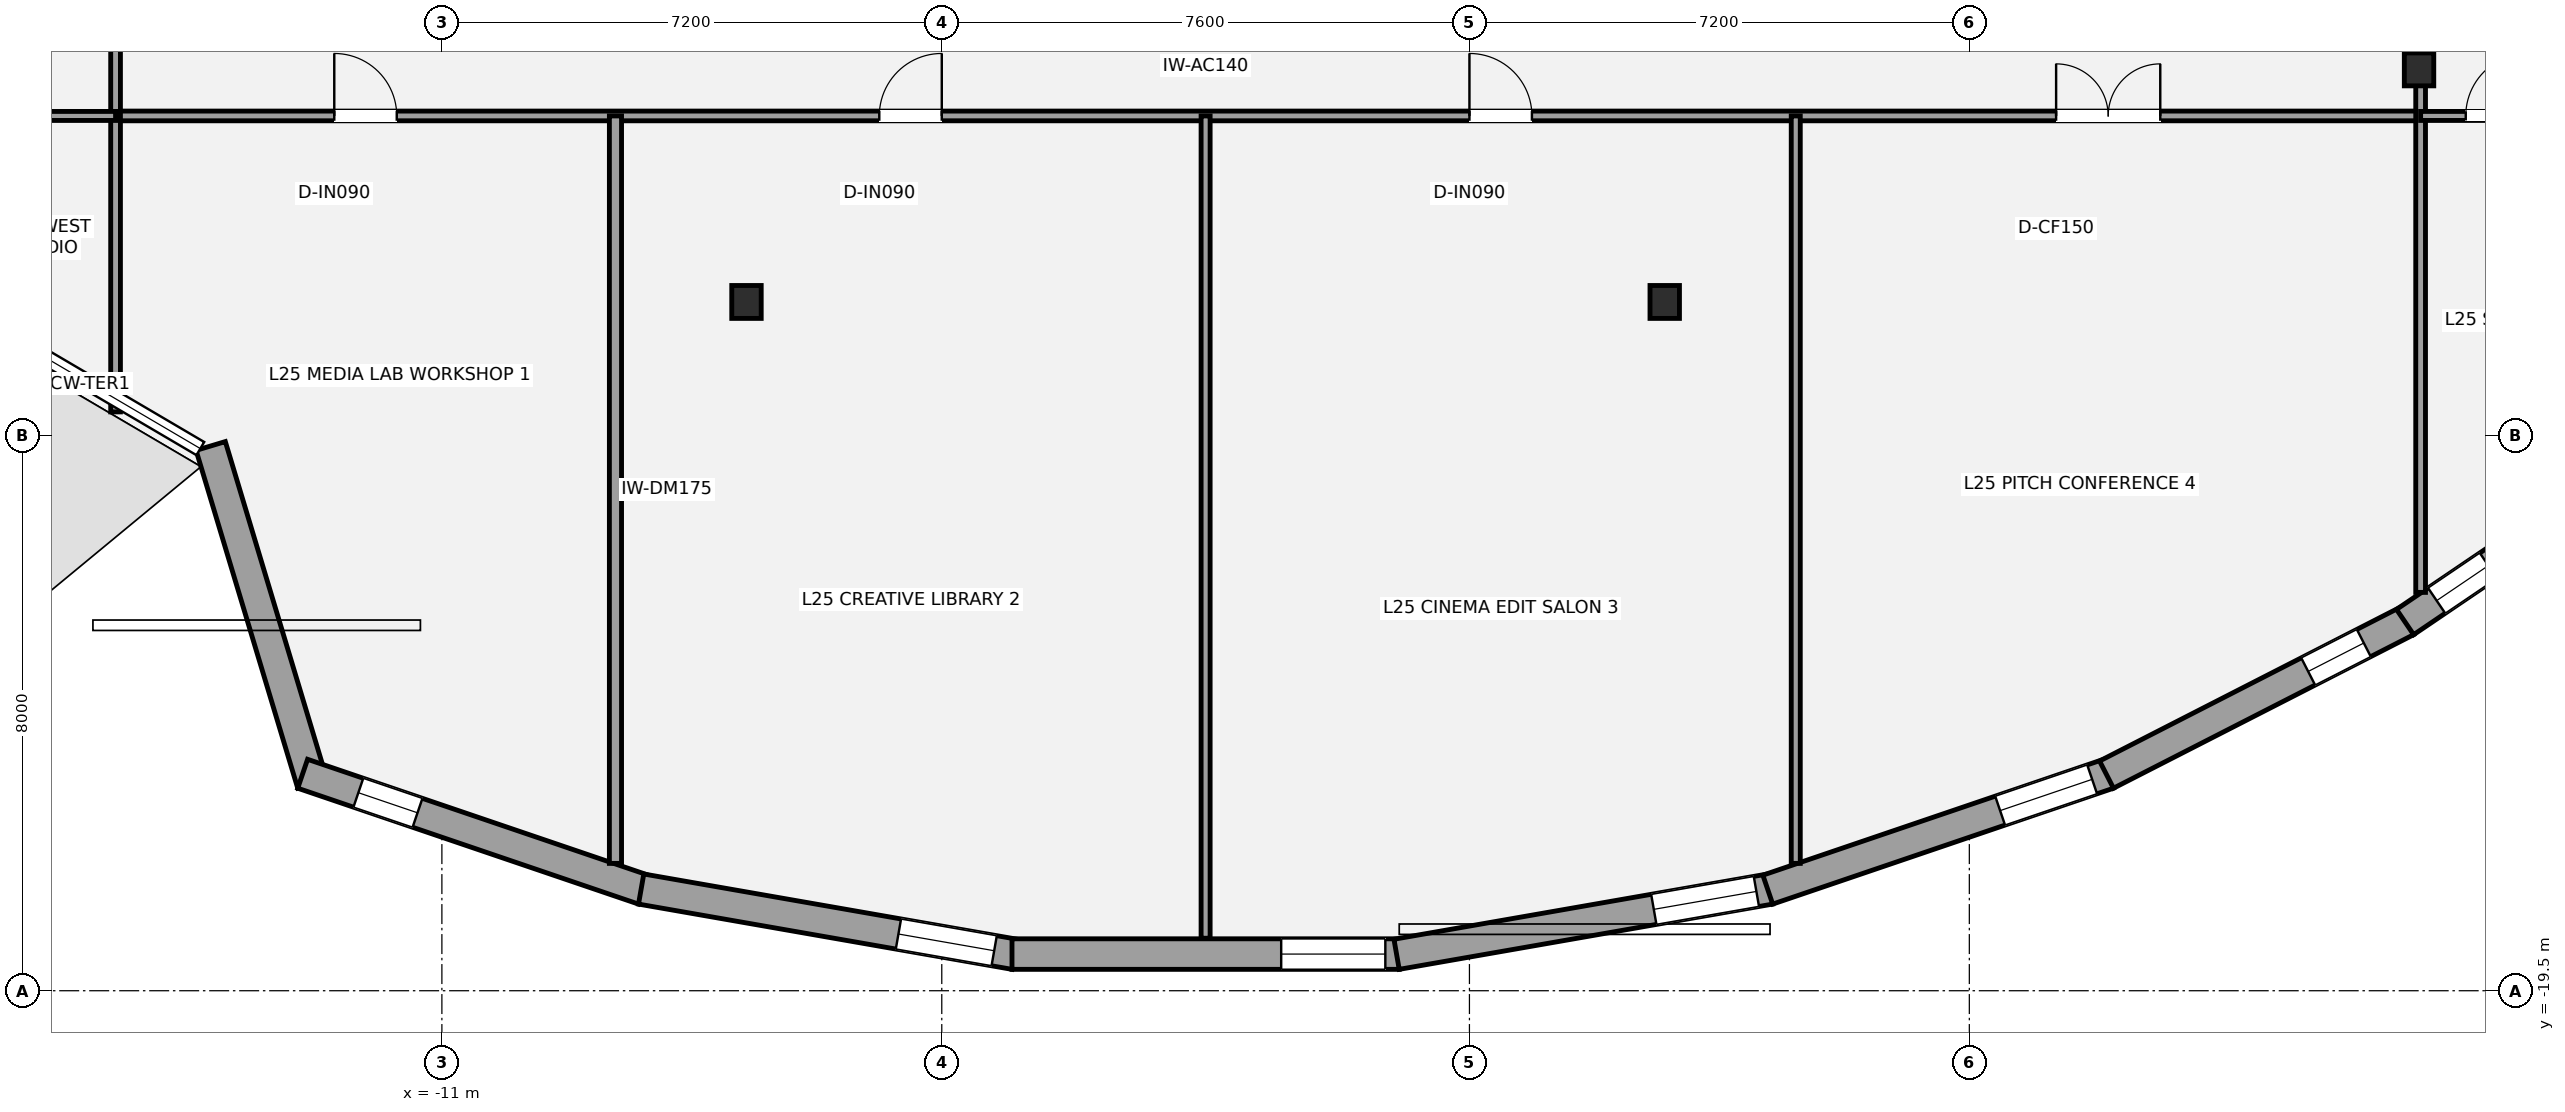
"""IFC4 building model, lengths in metres.
Left out: names, types, materials, properties, quantities, classifications, styles, units other than length and angle.
Written with IfcOpenShell. Run it as: python <this file> out.ifc"""

import sys

from ifc_helpers import new_model, si_unit, direction, frame, frame_2d, origin, origin_2d, place, context, subcontext, project, spatial, rectangle, i_section, extrude, element, fill, save


model = new_model("IFC4")
c1 = context("Model", 3, precision=1e-05, world=origin(), true_north=direction((0.0, 1.0)))
c2 = subcontext(c1, "Body", "Model", "MODEL_VIEW")
j1 = project(units=[si_unit("LENGTHUNIT", "METRE"), si_unit("PLANEANGLEUNIT", "RADIAN")], contexts=[c1])
p1 = place(None, origin())
s1 = spatial("IfcSite", under=j1, at=p1, CompositionType="ELEMENT")
p2 = place(p1, origin())
s2 = spatial("IfcBuilding", under=s1, at=p2, CompositionType="ELEMENT")
p3 = place(p2, frame((0.0, 0.0, 96.6)))
s3 = spatial("IfcBuildingStorey", under=s2, at=p3, CompositionType="ELEMENT", Elevation=96.6)
for number, where, z_axis, x_axis in (
    (1, (-6.613, -9.579, 0.0), (0.0, 0.0, 1.0), (1.0, 0.0, 0.0)),
    (2, (6.613, -9.579, 0.0), (0.0, 0.0, 1.0), (1.0, 0.0, 0.0)),
    (3, (17.477, -6.229, 0.0), (0.0, 0.0, 1.0), (1.0, 0.0, 0.0)),
):
    element("IfcColumn", number, at=place(p3, frame(where, z_axis=z_axis, x_axis=x_axis)), inside=s3, PredefinedType="COLUMN", context=c2, shape_type="SweptSolid", body=[
        extrude(i_section(OverallWidth=0.424, OverallDepth=0.474, WebThickness=0.048, FlangeThickness=0.077, at=origin_2d()), origin(), (0.0, 0.0, 1.0), 3.5),
    ])
p4 = place(p3, frame((-12.865, -16.52, 0.0), z_axis=(0.0, 0.0, 1.0), x_axis=(-0.288172032056, 0.957578654702, 0.0)))
e4 = element("IfcWall", 4, at=p4, inside=s3, PredefinedType="STANDARD", context=c2, shape_type="SweptSolid", body=[
    extrude(rectangle(XDim=5.082, YDim=0.44, at=frame_2d((2.541, 0.0))), origin(), (0.0, 0.0, 1.0), 2.532),
])
p5 = place(p3, frame((-8.097, -18.044, 0.0), z_axis=(0.0, 0.0, 1.0), x_axis=(-0.946763558794, 0.321929749697, 0.0)))
e5 = element("IfcWall", 5, at=p5, inside=s3, PredefinedType="STANDARD", context=c2, shape_type="SweptSolid", body=[
    extrude(rectangle(XDim=5.184, YDim=0.44, at=frame_2d((2.592, 0.0))), origin(), (0.0, 0.0, 1.0), 2.528),
])
p6 = place(p5, frame((3.437, 0.0, 0.58)))
e6 = element("IfcOpeningElement", 6, at=p6, cuts=e5, PredefinedType="OPENING", context=c2, shape_type="SweptSolid", body=[
    extrude(rectangle(XDim=0.9, YDim=1.35, at=frame_2d((0.45, 0.675))), frame((0.0, 0.23, 0.0), z_axis=(0.0, -1.0, 0.0), x_axis=(1.0, 0.0, 0.0)), (0.0, 0.0, 1.0), 0.46),
])
p7 = place(p3, frame((-2.751, -18.975, 0.0), z_axis=(0.0, 0.0, 1.0), x_axis=(-0.985074276728, 0.172129803722, 0.0)))
e7 = element("IfcWall", 7, at=p7, inside=s3, PredefinedType="STANDARD", context=c2, shape_type="SweptSolid", body=[
    extrude(rectangle(XDim=5.461, YDim=0.44, at=frame_2d((2.73, 0.0))), origin(), (0.0, 0.0, 1.0), 2.528),
])
p8 = place(p7, frame((0.299, 0.0, 0.58)))
e8 = element("IfcOpeningElement", 8, at=p8, cuts=e7, PredefinedType="OPENING", context=c2, shape_type="SweptSolid", body=[
    extrude(rectangle(XDim=1.4, YDim=1.55, at=frame_2d((0.7, 0.775))), frame((0.0, 0.23, 0.0), z_axis=(0.0, -1.0, 0.0), x_axis=(1.0, 0.0, 0.0)), (0.0, 0.0, 1.0), 0.46),
])
p9 = place(p3, frame((2.789, -18.972, 0.0), z_axis=(0.0, 0.0, 1.0), x_axis=(-1.0, 0.0, 0.0)))
e9 = element("IfcWall", 9, at=p9, inside=s3, PredefinedType="STANDARD", context=c2, shape_type="SweptSolid", body=[
    extrude(rectangle(XDim=5.577, YDim=0.44, at=frame_2d((2.789, 0.0))), origin(), (0.0, 0.0, 1.0), 2.528),
])
p10 = place(p9, frame((0.2, 0.0, 0.65)))
e10 = element("IfcOpeningElement", 10, at=p10, cuts=e9, PredefinedType="OPENING", context=c2, shape_type="SweptSolid", body=[
    extrude(rectangle(XDim=1.5, YDim=1.7, at=frame_2d((0.75, 0.85))), frame((0.0, 0.23, 0.0), z_axis=(0.0, -1.0, 0.0), x_axis=(1.0, 0.0, 0.0)), (0.0, 0.0, 1.0), 0.46),
])
p11 = place(p3, frame((8.13, -18.035, 0.0), z_axis=(0.0, 0.0, 1.0), x_axis=(-0.985074276728, -0.172129803722, 0.0)))
e11 = element("IfcWall", 11, at=p11, inside=s3, PredefinedType="STANDARD", context=c2, shape_type="SweptSolid", body=[
    extrude(rectangle(XDim=5.461, YDim=0.44, at=frame_2d((2.73, 0.0))), origin(), (0.0, 0.0, 1.0), 2.528),
])
p12 = place(p11, frame((0.2, 0.0, 0.48)))
e12 = element("IfcOpeningElement", 12, at=p12, cuts=e11, PredefinedType="OPENING", context=c2, shape_type="SweptSolid", body=[
    extrude(rectangle(XDim=1.5, YDim=1.7, at=frame_2d((0.75, 0.85))), frame((0.0, 0.23, 0.0), z_axis=(0.0, -1.0, 0.0), x_axis=(1.0, 0.0, 0.0)), (0.0, 0.0, 1.0), 0.46),
])
p13 = place(p3, frame((13.005, -16.375, 0.0), z_axis=(0.0, 0.0, 1.0), x_axis=(-0.946763558794, -0.321929749697, 0.0)))
e13 = element("IfcWall", 13, at=p13, inside=s3, PredefinedType="STANDARD", context=c2, shape_type="SweptSolid", body=[
    extrude(rectangle(XDim=5.184, YDim=0.44, at=frame_2d((2.592, 0.0))), origin(), (0.0, 0.0, 1.0), 2.528),
])
p14 = place(p13, frame((0.25, 0.0, 0.85)))
e14 = element("IfcOpeningElement", 14, at=p14, cuts=e13, PredefinedType="OPENING", context=c2, shape_type="SweptSolid", body=[
    extrude(rectangle(XDim=1.4, YDim=1.55, at=frame_2d((0.7, 0.775))), frame((0.0, 0.23, 0.0), z_axis=(0.0, -1.0, 0.0), x_axis=(1.0, 0.0, 0.0)), (0.0, 0.0, 1.0), 0.46),
])
p15 = place(p3, frame((17.3, -14.176, 0.0), z_axis=(0.0, 0.0, 1.0), x_axis=(-0.890297461787, -0.455379434687, 0.0)))
e15 = element("IfcWall", 15, at=p15, inside=s3, PredefinedType="STANDARD", context=c2, shape_type="SweptSolid", body=[
    extrude(rectangle(XDim=4.856, YDim=0.44, at=frame_2d((2.428, 0.0))), origin(), (0.0, 0.0, 1.0), 2.528),
])
p16 = place(p15, frame((0.694, 0.0, 0.58)))
e16 = element("IfcOpeningElement", 16, at=p16, cuts=e15, PredefinedType="OPENING", context=c2, shape_type="SweptSolid", body=[
    extrude(rectangle(XDim=0.9, YDim=1.35, at=frame_2d((0.45, 0.675))), frame((0.0, 0.23, 0.0), z_axis=(0.0, -1.0, 0.0), x_axis=(1.0, 0.0, 0.0)), (0.0, 0.0, 1.0), 0.46),
])
p17 = place(p3, frame((21.078, -11.613, 0.0), z_axis=(0.0, 0.0, 1.0), x_axis=(-0.827740300315, -0.561111392893, 0.0)))
e17 = element("IfcWall", 17, at=p17, inside=s3, PredefinedType="STANDARD", context=c2, shape_type="SweptSolid", body=[
    extrude(rectangle(XDim=4.593, YDim=0.44, at=frame_2d((2.296, 0.0))), origin(), (0.0, 0.0, 1.0), 2.528),
])
p18 = place(p17, frame((3.144, 0.0, 0.58)))
e18 = element("IfcOpeningElement", 18, at=p18, cuts=e17, PredefinedType="OPENING", context=c2, shape_type="SweptSolid", body=[
    extrude(rectangle(XDim=0.9, YDim=1.35, at=frame_2d((0.45, 0.675))), frame((0.0, 0.23, 0.0), z_axis=(0.0, -1.0, 0.0), x_axis=(1.0, 0.0, 0.0)), (0.0, 0.0, 1.0), 0.46),
])
p19 = place(p3, frame((-15.7, -6.9, 0.0), z_axis=(0.0, 0.0, 1.0), x_axis=(1.0, 0.0, 0.0)))
e19 = element("IfcWall", 19, at=p19, inside=s3, PredefinedType="PARTITIONING", context=c2, shape_type="SweptSolid", body=[
    extrude(rectangle(XDim=33.2, YDim=0.14, at=frame_2d((16.6, 0.0))), origin(), (0.0, 0.0, 1.0), 2.688),
])
p20 = place(p19, frame((3.15, 0.0, 0.0)))
e20 = element("IfcOpeningElement", 20, at=p20, cuts=e19, PredefinedType="OPENING", context=c2, shape_type="SweptSolid", body=[
    extrude(rectangle(XDim=0.9, YDim=2.1, at=frame_2d((0.45, 1.05))), frame((0.0, 0.08, 0.0), z_axis=(0.0, -1.0, 0.0), x_axis=(1.0, 0.0, 0.0)), (0.0, 0.0, 1.0), 0.16),
])
p21 = place(p19, frame((11.0, 0.0, 0.0)))
e21 = element("IfcOpeningElement", 21, at=p21, cuts=e19, PredefinedType="OPENING", context=c2, shape_type="SweptSolid", body=[
    extrude(rectangle(XDim=0.9, YDim=2.1, at=frame_2d((0.45, 1.05))), frame((0.0, 0.08, 0.0), z_axis=(0.0, -1.0, 0.0), x_axis=(1.0, 0.0, 0.0)), (0.0, 0.0, 1.0), 0.16),
])
p22 = place(p19, frame((19.5, 0.0, 0.0)))
e22 = element("IfcOpeningElement", 22, at=p22, cuts=e19, PredefinedType="OPENING", context=c2, shape_type="SweptSolid", body=[
    extrude(rectangle(XDim=0.9, YDim=2.1, at=frame_2d((0.45, 1.05))), frame((0.0, 0.08, 0.0), z_axis=(0.0, -1.0, 0.0), x_axis=(1.0, 0.0, 0.0)), (0.0, 0.0, 1.0), 0.16),
])
p23 = place(p19, frame((27.95, 0.0, 0.0)))
e23 = element("IfcOpeningElement", 23, at=p23, cuts=e19, PredefinedType="OPENING", context=c2, shape_type="SweptSolid", body=[
    extrude(rectangle(XDim=1.5, YDim=2.15, at=frame_2d((0.75, 1.075))), frame((0.0, 0.08, 0.0), z_axis=(0.0, -1.0, 0.0), x_axis=(1.0, 0.0, 0.0)), (0.0, 0.0, 1.0), 0.16),
])
p24 = place(p3, frame((-15.7, -11.163, 0.0), z_axis=(0.0, 0.0, 1.0), x_axis=(0.0, 1.0, 0.0)))
e24 = element("IfcWall", 24, at=p24, inside=s3, PredefinedType="PARTITIONING", context=c2, shape_type="SweptSolid", body=[
    extrude(rectangle(XDim=18.713, YDim=0.14, at=frame_2d((9.356, 0.0))), origin(), (0.0, 0.0, 1.0), 2.751),
])
p25 = place(p24, frame((6.263, 0.0, 0.0)))
e25 = element("IfcOpeningElement", 25, at=p25, cuts=e24, PredefinedType="OPENING", context=c2, shape_type="SweptSolid", body=[
    extrude(rectangle(XDim=0.9, YDim=2.1, at=frame_2d((0.45, 1.05))), frame((0.0, 0.08, 0.0), z_axis=(0.0, -1.0, 0.0), x_axis=(1.0, 0.0, 0.0)), (0.0, 0.0, 1.0), 0.16),
])
p26 = place(p24, frame((10.613, 0.0, 0.0)))
e26 = element("IfcOpeningElement", 26, at=p26, cuts=e24, PredefinedType="OPENING", context=c2, shape_type="SweptSolid", body=[
    extrude(rectangle(XDim=0.9, YDim=2.1, at=frame_2d((0.45, 1.05))), frame((0.0, 0.08, 0.0), z_axis=(0.0, -1.0, 0.0), x_axis=(1.0, 0.0, 0.0)), (0.0, 0.0, 1.0), 0.16),
])
p27 = place(p24, frame((14.113, 0.0, 0.0)))
e27 = element("IfcOpeningElement", 27, at=p27, cuts=e24, PredefinedType="OPENING", context=c2, shape_type="SweptSolid", body=[
    extrude(rectangle(XDim=0.9, YDim=2.1, at=frame_2d((0.45, 1.05))), frame((0.0, 0.08, 0.0), z_axis=(0.0, -1.0, 0.0), x_axis=(1.0, 0.0, 0.0)), (0.0, 0.0, 1.0), 0.16),
])
p28 = place(p24, frame((16.988, 0.0, 0.0)))
e28 = element("IfcOpeningElement", 28, at=p28, cuts=e24, PredefinedType="OPENING", context=c2, shape_type="SweptSolid", body=[
    extrude(rectangle(XDim=0.9, YDim=2.1, at=frame_2d((0.45, 1.05))), frame((0.0, 0.08, 0.0), z_axis=(0.0, -1.0, 0.0), x_axis=(1.0, 0.0, 0.0)), (0.0, 0.0, 1.0), 0.16),
])
p29 = place(p3, frame((17.5, -13.763, 0.0), z_axis=(0.0, 0.0, 1.0), x_axis=(0.0, 1.0, 0.0)))
e29 = element("IfcWall", 29, at=p29, inside=s3, PredefinedType="PARTITIONING", context=c2, shape_type="SweptSolid", body=[
    extrude(rectangle(XDim=21.313, YDim=0.14, at=frame_2d((10.656, 0.0))), origin(), (0.0, 0.0, 1.0), 2.688),
])
p30 = place(p29, frame((10.963, 0.0, 0.0)))
e30 = element("IfcOpeningElement", 30, at=p30, cuts=e29, PredefinedType="OPENING", context=c2, shape_type="SweptSolid", body=[
    extrude(rectangle(XDim=0.9, YDim=2.1, at=frame_2d((0.45, 1.05))), frame((0.0, 0.08, 0.0), z_axis=(0.0, -1.0, 0.0), x_axis=(1.0, 0.0, 0.0)), (0.0, 0.0, 1.0), 0.16),
])
p31 = place(p29, frame((18.188, 0.0, 0.0)))
e31 = element("IfcOpeningElement", 31, at=p31, cuts=e29, PredefinedType="OPENING", context=c2, shape_type="SweptSolid", body=[
    extrude(rectangle(XDim=0.9, YDim=2.1, at=frame_2d((0.45, 1.05))), frame((0.0, 0.08, 0.0), z_axis=(0.0, -1.0, 0.0), x_axis=(1.0, 0.0, 0.0)), (0.0, 0.0, 1.0), 0.16),
])
p32 = place(p3, frame((-8.5, -17.666, 0.0), z_axis=(0.0, 0.0, 1.0), x_axis=(0.0, 1.0, 0.0)))
e32 = element("IfcWall", 32, at=p32, inside=s3, PredefinedType="PARTITIONING", context=c2, shape_type="SweptSolid", body=[
    extrude(rectangle(XDim=10.766, YDim=0.175, at=frame_2d((5.383, 0.0))), origin(), (0.0, 0.0, 1.0), 2.763),
])
p33 = place(p3, frame((0.0, -18.744, 0.0), z_axis=(0.0, 0.0, 1.0), x_axis=(0.0, 1.0, 0.0)))
e33 = element("IfcWall", 33, at=p33, inside=s3, PredefinedType="PARTITIONING", context=c2, shape_type="SweptSolid", body=[
    extrude(rectangle(XDim=11.844, YDim=0.13, at=frame_2d((5.922, 0.0))), origin(), (0.0, 0.0, 1.0), 2.763),
])
p34 = place(p3, frame((8.5, -17.666, 0.0), z_axis=(0.0, 0.0, 1.0), x_axis=(0.0, 1.0, 0.0)))
e34 = element("IfcWall", 34, at=p34, inside=s3, PredefinedType="PARTITIONING", context=c2, shape_type="SweptSolid", body=[
    extrude(rectangle(XDim=10.766, YDim=0.13, at=frame_2d((5.383, 0.0))), origin(), (0.0, 0.0, 1.0), 3.31),
])
p35 = place(p3, frame((-20.863, -6.9, 0.0), z_axis=(0.0, 0.0, 1.0), x_axis=(1.0, 0.0, 0.0)))
e35 = element("IfcWall", 35, at=p35, inside=s3, PredefinedType="PARTITIONING", context=c2, shape_type="SweptSolid", body=[
    extrude(rectangle(XDim=5.163, YDim=0.13, at=frame_2d((2.582, 0.0))), origin(), (0.0, 0.0, 1.0), 2.688),
])
p36 = place(p35, frame((1.11, 0.0, 0.0)))
e36 = element("IfcOpeningElement", 36, at=p36, cuts=e35, PredefinedType="OPENING", context=c2, shape_type="SweptSolid", body=[
    extrude(rectangle(XDim=0.9, YDim=2.1, at=frame_2d((0.45, 1.05))), frame((0.0, 0.075, 0.0), z_axis=(0.0, -1.0, 0.0), x_axis=(1.0, 0.0, 0.0)), (0.0, 0.0, 1.0), 0.15),
])
p37 = place(p3, frame((17.5, -6.9, 0.0), z_axis=(0.0, 0.0, 1.0), x_axis=(1.0, 0.0, 0.0)))
e37 = element("IfcWall", 37, at=p37, inside=s3, PredefinedType="PARTITIONING", context=c2, shape_type="SweptSolid", body=[
    extrude(rectangle(XDim=7.86, YDim=0.13, at=frame_2d((3.93, 0.0))), origin(), (0.0, 0.0, 1.0), 3.31),
])
p38 = place(p37, frame((0.65, 0.0, 0.0)))
e38 = element("IfcOpeningElement", 38, at=p38, cuts=e37, PredefinedType="OPENING", context=c2, shape_type="SweptSolid", body=[
    extrude(rectangle(XDim=0.9, YDim=2.1, at=frame_2d((0.45, 1.05))), frame((0.0, 0.075, 0.0), z_axis=(0.0, -1.0, 0.0), x_axis=(1.0, 0.0, 0.0)), (0.0, 0.0, 1.0), 0.15),
])
p39 = place(p6, origin())
e39 = element("IfcWindow", 39, at=p39, inside=s3, PartitioningType="SINGLE_PANEL", PredefinedType="WINDOW", context=c2, shape_type="SweptSolid", body=[
    extrude(rectangle(XDim=0.9, YDim=1.35, at=frame_2d((0.45, 0.675))), frame((0.0, -0.01, 0.0), z_axis=(0.0, -1.0, 0.0), x_axis=(1.0, 0.0, 0.0)), (0.0, 0.0, 1.0), 0.06),
])
fill(e6, e39)
p40 = place(p8, origin())
e40 = element("IfcWindow", 40, at=p40, inside=s3, PartitioningType="SINGLE_PANEL", PredefinedType="WINDOW", context=c2, shape_type="SweptSolid", body=[
    extrude(rectangle(XDim=1.4, YDim=1.55, at=frame_2d((0.7, 0.775))), frame((0.0, -0.01, 0.0), z_axis=(0.0, -1.0, 0.0), x_axis=(1.0, 0.0, 0.0)), (0.0, 0.0, 1.0), 0.06),
])
fill(e8, e40)
p41 = place(p10, origin())
e41 = element("IfcWindow", 41, at=p41, inside=s3, PartitioningType="SINGLE_PANEL", PredefinedType="WINDOW", context=c2, shape_type="SweptSolid", body=[
    extrude(rectangle(XDim=1.5, YDim=1.7, at=frame_2d((0.75, 0.85))), frame((0.0, -0.01, 0.0), z_axis=(0.0, -1.0, 0.0), x_axis=(1.0, 0.0, 0.0)), (0.0, 0.0, 1.0), 0.06),
])
fill(e10, e41)
p42 = place(p12, origin())
e42 = element("IfcWindow", 42, at=p42, inside=s3, PartitioningType="SINGLE_PANEL", PredefinedType="WINDOW", context=c2, shape_type="SweptSolid", body=[
    extrude(rectangle(XDim=1.5, YDim=1.7, at=frame_2d((0.75, 0.85))), frame((0.0, -0.01, 0.0), z_axis=(0.0, -1.0, 0.0), x_axis=(1.0, 0.0, 0.0)), (0.0, 0.0, 1.0), 0.06),
])
fill(e12, e42)
p43 = place(p14, origin())
e43 = element("IfcWindow", 43, at=p43, inside=s3, PartitioningType="SINGLE_PANEL", PredefinedType="WINDOW", context=c2, shape_type="SweptSolid", body=[
    extrude(rectangle(XDim=1.4, YDim=1.55, at=frame_2d((0.7, 0.775))), frame((0.0, -0.01, 0.0), z_axis=(0.0, -1.0, 0.0), x_axis=(1.0, 0.0, 0.0)), (0.0, 0.0, 1.0), 0.06),
])
fill(e14, e43)
p44 = place(p16, origin())
e44 = element("IfcWindow", 44, at=p44, inside=s3, PartitioningType="SINGLE_PANEL", PredefinedType="WINDOW", context=c2, shape_type="SweptSolid", body=[
    extrude(rectangle(XDim=0.9, YDim=1.35, at=frame_2d((0.45, 0.675))), frame((0.0, -0.01, 0.0), z_axis=(0.0, -1.0, 0.0), x_axis=(1.0, 0.0, 0.0)), (0.0, 0.0, 1.0), 0.06),
])
fill(e16, e44)
p45 = place(p18, origin())
e45 = element("IfcWindow", 45, at=p45, inside=s3, PartitioningType="SINGLE_PANEL", PredefinedType="WINDOW", context=c2, shape_type="SweptSolid", body=[
    extrude(rectangle(XDim=0.9, YDim=1.35, at=frame_2d((0.45, 0.675))), frame((0.0, -0.01, 0.0), z_axis=(0.0, -1.0, 0.0), x_axis=(1.0, 0.0, 0.0)), (0.0, 0.0, 1.0), 0.06),
])
fill(e18, e45)
p46 = place(p20, origin())
e46 = element("IfcDoor", 46, at=p46, inside=s3, OperationType="SINGLE_SWING_LEFT", PredefinedType="DOOR", context=c2, shape_type="SweptSolid", body=[
    extrude(rectangle(XDim=0.9, YDim=2.1, at=frame_2d((0.45, 1.05))), frame((0.0, 0.025, 0.0), z_axis=(0.0, -1.0, 0.0), x_axis=(1.0, 0.0, 0.0)), (0.0, 0.0, 1.0), 0.05),
])
fill(e20, e46)
p47 = place(p21, origin())
e47 = element("IfcDoor", 47, at=p47, inside=s3, OperationType="SINGLE_SWING_RIGHT", PredefinedType="DOOR", context=c2, shape_type="SweptSolid", body=[
    extrude(rectangle(XDim=0.9, YDim=2.1, at=frame_2d((0.45, 1.05))), frame((0.0, 0.025, 0.0), z_axis=(0.0, -1.0, 0.0), x_axis=(1.0, 0.0, 0.0)), (0.0, 0.0, 1.0), 0.05),
])
fill(e21, e47)
p48 = place(p22, origin())
e48 = element("IfcDoor", 48, at=p48, inside=s3, OperationType="SINGLE_SWING_LEFT", PredefinedType="DOOR", context=c2, shape_type="SweptSolid", body=[
    extrude(rectangle(XDim=0.9, YDim=2.1, at=frame_2d((0.45, 1.05))), frame((0.0, 0.025, 0.0), z_axis=(0.0, -1.0, 0.0), x_axis=(1.0, 0.0, 0.0)), (0.0, 0.0, 1.0), 0.05),
])
fill(e22, e48)
p49 = place(p23, origin())
e49 = element("IfcDoor", 49, at=p49, inside=s3, OperationType="DOUBLE_DOOR_SINGLE_SWING", PredefinedType="DOOR", context=c2, shape_type="SweptSolid", body=[
    extrude(rectangle(XDim=1.5, YDim=2.15, at=frame_2d((0.75, 1.075))), frame((0.0, 0.025, 0.0), z_axis=(0.0, -1.0, 0.0), x_axis=(1.0, 0.0, 0.0)), (0.0, 0.0, 1.0), 0.05),
])
fill(e23, e49)
p50 = place(p38, origin())
e50 = element("IfcDoor", 50, at=p50, inside=s3, OperationType="SINGLE_SWING_RIGHT", PredefinedType="DOOR", context=c2, shape_type="SweptSolid", body=[
    extrude(rectangle(XDim=0.9, YDim=2.1, at=frame_2d((0.45, 1.05))), frame((0.0, 0.025, 0.0), z_axis=(0.0, -1.0, 0.0), x_axis=(1.0, 0.0, 0.0)), (0.0, 0.0, 1.0), 0.05),
])
fill(e38, e50)
save(model, sys.argv[1])
